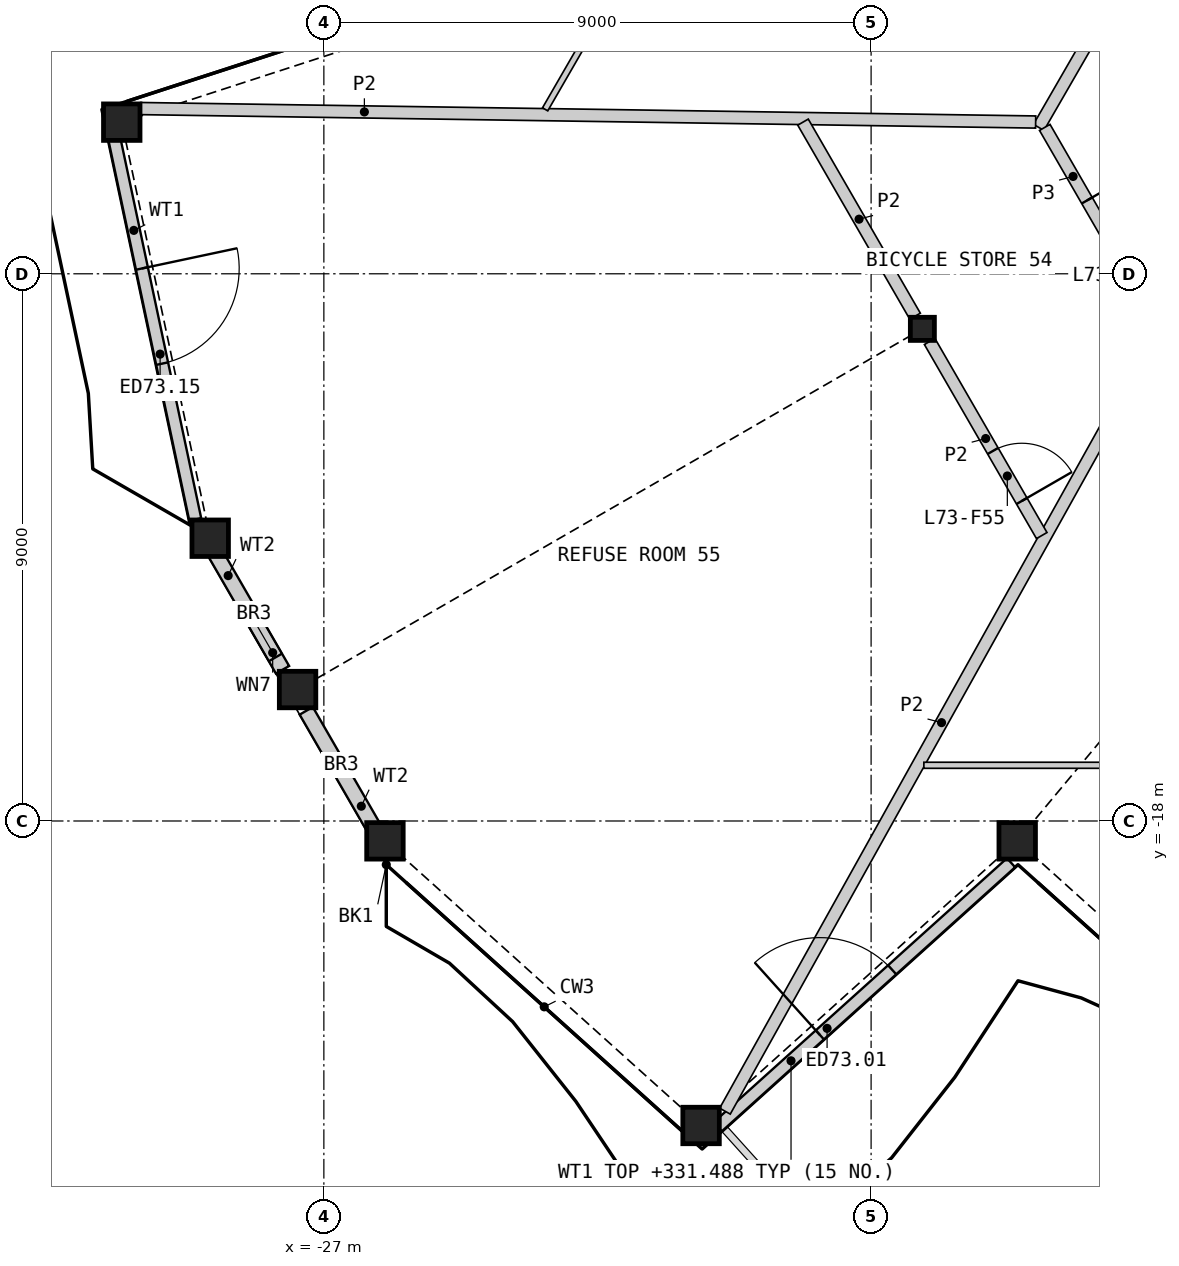
"""IFC4 building model, lengths in metres.
Left out: names, types, materials, properties, quantities, classifications, styles, units other than length and angle.
Written with IfcOpenShell. Run it as: python <this file> out.ifc"""

import sys

from ifc_helpers import new_model, si_unit, direction, frame, frame_2d, origin, origin_2d, place, context, subcontext, project, spatial, rectangle, hollow_rectangle, i_section, extrude, element, fill, save


model = new_model("IFC4")
c1 = context("Model", 3, precision=1e-05, world=origin(), true_north=direction((0.0, 1.0)))
c2 = subcontext(c1, "Body", "Model", "MODEL_VIEW")
j1 = project(units=[si_unit("LENGTHUNIT", "METRE"), si_unit("PLANEANGLEUNIT", "RADIAN")], contexts=[c1])
p1 = place(None, origin())
s1 = spatial("IfcSite", under=j1, at=p1, CompositionType="ELEMENT")
p2 = place(p1, origin())
s2 = spatial("IfcBuilding", under=s1, at=p2, CompositionType="ELEMENT")
p3 = place(p2, frame((0.0, 0.0, 329.0)))
s3 = spatial("IfcBuildingStorey", under=s2, at=p3, CompositionType="ELEMENT", Elevation=329.0)
for number, where, z_axis, x_axis in (
    (1, (-25.995, -18.327, 0.0), (0.0, 0.0, 1.0), (1.0, 0.0, 0.0)),
    (2, (-20.796, -23.008, 0.0), (0.0, 0.0, 1.0), (1.0, 0.0, 0.0)),
    (3, (-15.597, -18.327, 0.0), (0.0, 0.0, 1.0), (1.0, 0.0, 0.0)),
    (4, (-30.324, -6.506, 0.0), (0.0, 0.0, 1.0), (1.0, 0.0, 0.0)),
    (5, (-28.869, -13.349, 0.0), (0.0, 0.0, 1.0), (1.0, 0.0, 0.0)),
    (6, (-27.432, -15.838, 0.0), (0.0, 0.0, 1.0), (1.0, 0.0, 0.0)),
):
    element("IfcColumn", number, at=place(p3, frame(where, z_axis=z_axis, x_axis=x_axis)), inside=s3, PredefinedType="COLUMN", context=c2, shape_type="SweptSolid", body=[
        extrude(hollow_rectangle(XDim=0.6, YDim=0.6, WallThickness=0.04, at=origin_2d()), origin(), (0.0, 0.0, 1.0), 3.4),
    ])
p4 = place(p3, frame((-17.157, -9.906, 0.0), z_axis=(0.0, 0.0, 1.0), x_axis=(1.0, 0.0, 0.0)))
e7 = element("IfcColumn", 7, at=p4, inside=s3, PredefinedType="COLUMN", context=c2, shape_type="SweptSolid", body=[
    extrude(i_section(OverallWidth=0.396, OverallDepth=0.381, WebThickness=0.019, FlangeThickness=0.03, at=origin_2d()), origin(), (0.0, 0.0, 1.0), 3.4),
])
p5 = place(p3, frame((-20.523, -23.031, 0.0), z_axis=(0.0, 0.0, 1.0), x_axis=(0.743138937876, 0.669137145145, 0.0)))
e8 = element("IfcWall", 8, at=p5, inside=s3, PredefinedType="SOLIDWALL", context=c2, shape_type="SweptSolid", body=[
    extrude(rectangle(XDim=6.493, YDim=0.2, at=frame_2d((3.246, 0.0))), origin(), (0.0, 0.0, 1.0), 2.488),
])
p6 = place(p5, frame((2.261, 0.0, 0.0)))
e9 = element("IfcOpeningElement", 9, at=p6, cuts=e8, PredefinedType="OPENING", context=c2, shape_type="SweptSolid", body=[
    extrude(rectangle(XDim=1.6, YDim=2.25, at=frame_2d((0.8, 1.125))), frame((0.0, 0.11, 0.0), z_axis=(0.0, -1.0, 0.0), x_axis=(1.0, 0.0, 0.0)), (0.0, 0.0, 1.0), 0.22),
])
p7 = place(p3, frame((-30.462, -6.701, 0.0), z_axis=(0.0, 0.0, 1.0), x_axis=(0.207915966693, -0.978146691859, 0.0)))
e10 = element("IfcWall", 10, at=p7, inside=s3, PredefinedType="SOLIDWALL", context=c2, shape_type="SweptSolid", body=[
    extrude(rectangle(XDim=6.482, YDim=0.2, at=frame_2d((3.241, 0.0))), origin(), (0.0, 0.0, 1.0), 2.488),
])
p8 = place(p7, frame((2.261, 0.0, 0.0)))
e11 = element("IfcOpeningElement", 11, at=p8, cuts=e10, PredefinedType="OPENING", context=c2, shape_type="SweptSolid", body=[
    extrude(rectangle(XDim=1.6, YDim=2.25, at=frame_2d((0.8, 1.125))), frame((0.0, 0.11, 0.0), z_axis=(0.0, -1.0, 0.0), x_axis=(1.0, 0.0, 0.0)), (0.0, 0.0, 1.0), 0.22),
])
p9 = place(p3, frame((-28.872, -13.448, 0.0), z_axis=(0.0, 0.0, 1.0), x_axis=(0.499982446489, -0.866035538072, 0.0)))
e12 = element("IfcWall", 12, at=p9, inside=s3, PredefinedType="SOLIDWALL", context=c2, shape_type="SweptSolid", body=[
    extrude(rectangle(XDim=2.384, YDim=0.25, at=frame_2d((1.192, 0.0))), origin(), (0.0, 0.0, 1.0), 2.488),
])
p10 = place(p9, frame((1.25, 0.0, 1.6)))
e13 = element("IfcOpeningElement", 13, at=p10, cuts=e12, PredefinedType="OPENING", context=c2, shape_type="SweptSolid", body=[
    extrude(rectangle(XDim=0.9, YDim=0.6, at=frame_2d((0.45, 0.3))), frame((0.0, 0.135, 0.0), z_axis=(0.0, -1.0, 0.0), x_axis=(1.0, 0.0, 0.0)), (0.0, 0.0, 1.0), 0.27),
])
p11 = place(p3, frame((-27.29, -16.188, 0.0), z_axis=(0.0, 0.0, 1.0), x_axis=(0.50001992892, -0.866013897511, 0.0)))
e14 = element("IfcWall", 14, at=p11, inside=s3, PredefinedType="SOLIDWALL", context=c2, shape_type="SweptSolid", body=[
    extrude(rectangle(XDim=2.416, YDim=0.25, at=frame_2d((1.208, 0.0))), origin(), (0.0, 0.0, 1.0), 2.488),
])
p12 = place(p3, frame((-15.244, -6.592, 0.0), z_axis=(0.0, 0.0, 1.0), x_axis=(0.49999094734, 0.866030630277, 0.0)))
e15 = element("IfcWall", 15, at=p12, inside=s3, PredefinedType="PARTITIONING", context=c2, shape_type="SweptSolid", body=[
    extrude(rectangle(XDim=4.513, YDim=0.2, at=frame_2d((2.256, 0.0))), origin(), (0.0, 0.0, 1.0), 3.1),
])
p13 = place(p3, frame((-15.144, -6.592, 0.0), z_axis=(0.0, 0.0, 1.0), x_axis=(0.499958791762, -0.866049194065, 0.0)))
e16 = element("IfcWall", 16, at=p13, inside=s3, PredefinedType="PARTITIONING", context=c2, shape_type="SweptSolid", body=[
    extrude(rectangle(XDim=3.726, YDim=0.2, at=frame_2d((1.863, 0.0))), origin(), (0.0, 0.0, 1.0), 3.1),
])
p14 = place(p13, frame((1.388, 0.0, 0.0)))
e17 = element("IfcOpeningElement", 17, at=p14, cuts=e16, PredefinedType="OPENING", context=c2, shape_type="SweptSolid", body=[
    extrude(rectangle(XDim=0.95, YDim=2.1, at=frame_2d((0.475, 1.05))), frame((0.0, 0.11, 0.0), z_axis=(0.0, -1.0, 0.0), x_axis=(1.0, 0.0, 0.0)), (0.0, 0.0, 1.0), 0.22),
])
p15 = place(p3, frame((-20.404, -22.772, 0.0), z_axis=(0.0, 0.0, 1.0), x_axis=(0.486917529285, 0.873447949036, 0.0)))
e18 = element("IfcWall", 18, at=p15, inside=s3, PredefinedType="PARTITIONING", context=c2, shape_type="SweptSolid", body=[
    extrude(rectangle(XDim=14.631, YDim=0.2, at=frame_2d((7.315, 0.0))), origin(), (0.0, 0.0, 1.0), 2.33),
])
p16 = place(p3, frame((-30.014, -6.282, 0.0), z_axis=(0.0, 0.0, 1.0), x_axis=(0.99988686643, -0.015041753265, 0.0)))
e19 = element("IfcWall", 19, at=p16, inside=s3, PredefinedType="PARTITIONING", context=c2, shape_type="SweptSolid", body=[
    extrude(rectangle(XDim=14.721, YDim=0.2, at=frame_2d((7.361, 0.0))), origin(), (0.0, 0.0, 1.0), 2.33),
])
p17 = place(p3, frame((-17.037, -10.113, 0.0), z_axis=(0.0, 0.0, 1.0), x_axis=(0.50002820729, -0.866009117685, 0.0)))
e20 = element("IfcWall", 20, at=p17, inside=s3, PredefinedType="PARTITIONING", context=c2, shape_type="SweptSolid", body=[
    extrude(rectangle(XDim=3.686, YDim=0.2, at=frame_2d((1.843, 0.0))), origin(), (0.0, 0.0, 1.0), 2.33),
])
p18 = place(p17, frame((2.08, 0.0, 0.0)))
e21 = element("IfcOpeningElement", 21, at=p18, cuts=e20, PredefinedType="OPENING", context=c2, shape_type="SweptSolid", body=[
    extrude(rectangle(XDim=0.95, YDim=2.1, at=frame_2d((0.475, 1.05))), frame((0.0, 0.11, 0.0), z_axis=(0.0, -1.0, 0.0), x_axis=(1.0, 0.0, 0.0)), (0.0, 0.0, 1.0), 0.22),
])
p19 = place(p3, frame((-19.12, -6.506, 0.0), z_axis=(0.0, 0.0, 1.0), x_axis=(0.499978535015, -0.866037796245, 0.0)))
e22 = element("IfcWall", 22, at=p19, inside=s3, PredefinedType="PARTITIONING", context=c2, shape_type="SweptSolid", body=[
    extrude(rectangle(XDim=3.686, YDim=0.2, at=frame_2d((1.843, 0.0))), origin(), (0.0, 0.0, 1.0), 2.33),
])
p20 = place(p3, frame((-23.361, -6.295, 0.0), z_axis=(0.0, 0.0, 1.0), x_axis=(0.499987686533, 0.866032512851, 0.0)))
e23 = element("IfcWall", 23, at=p20, inside=s3, PredefinedType="PARTITIONING", context=c2, shape_type="SweptSolid", body=[
    extrude(rectangle(XDim=6.693, YDim=0.1, at=frame_2d((3.347, 0.0))), origin(), (0.0, 0.0, 1.0), 2.33),
])
p21 = place(p20, frame((3.275, 0.0, 0.0)))
e24 = element("IfcOpeningElement", 24, at=p21, cuts=e23, PredefinedType="OPENING", context=c2, shape_type="SweptSolid", body=[
    extrude(rectangle(XDim=0.95, YDim=2.1, at=frame_2d((0.475, 1.05))), frame((0.0, 0.06, 0.0), z_axis=(0.0, -1.0, 0.0), x_axis=(1.0, 0.0, 0.0)), (0.0, 0.0, 1.0), 0.12),
])
p22 = place(p3, frame((-17.132, -17.084, 0.0), z_axis=(0.0, 0.0, 1.0), x_axis=(1.0, 0.0, 0.0)))
e25 = element("IfcWall", 25, at=p22, inside=s3, PredefinedType="PARTITIONING", context=c2, shape_type="SweptSolid", body=[
    extrude(rectangle(XDim=6.693, YDim=0.1, at=frame_2d((3.346, 0.0))), origin(), (0.0, 0.0, 1.0), 2.33),
])
p23 = place(p22, frame((4.989, 0.0, 0.0)))
e26 = element("IfcOpeningElement", 26, at=p23, cuts=e25, PredefinedType="OPENING", context=c2, shape_type="SweptSolid", body=[
    extrude(rectangle(XDim=0.95, YDim=2.1, at=frame_2d((0.475, 1.05))), frame((0.0, 0.06, 0.0), z_axis=(0.0, -1.0, 0.0), x_axis=(1.0, 0.0, 0.0)), (0.0, 0.0, 1.0), 0.12),
])
p24 = place(p6, origin())
e27 = element("IfcDoor", 27, at=p24, inside=s3, OperationType="DOUBLE_DOOR_SINGLE_SWING", PredefinedType="DOOR", context=c2, shape_type="SweptSolid", body=[
    extrude(rectangle(XDim=1.6, YDim=2.25, at=frame_2d((0.8, 1.125))), frame((0.0, 0.025, 0.0), z_axis=(0.0, -1.0, 0.0), x_axis=(1.0, 0.0, 0.0)), (0.0, 0.0, 1.0), 0.05),
])
fill(e9, e27)
p25 = place(p8, origin())
e28 = element("IfcDoor", 28, at=p25, inside=s3, OperationType="DOUBLE_DOOR_SINGLE_SWING", PredefinedType="DOOR", context=c2, shape_type="SweptSolid", body=[
    extrude(rectangle(XDim=1.6, YDim=2.25, at=frame_2d((0.8, 1.125))), frame((0.0, 0.025, 0.0), z_axis=(0.0, -1.0, 0.0), x_axis=(1.0, 0.0, 0.0)), (0.0, 0.0, 1.0), 0.05),
])
fill(e11, e28)
p26 = place(p10, origin())
e29 = element("IfcWindow", 29, at=p26, inside=s3, PartitioningType="SINGLE_PANEL", PredefinedType="WINDOW", context=c2, shape_type="SweptSolid", body=[
    extrude(rectangle(XDim=0.9, YDim=0.6, at=frame_2d((0.45, 0.3))), frame((0.0, 0.03, 0.0), z_axis=(0.0, -1.0, 0.0), x_axis=(1.0, 0.0, 0.0)), (0.0, 0.0, 1.0), 0.06),
])
fill(e13, e29)
p27 = place(p14, origin())
e30 = element("IfcDoor", 30, at=p27, inside=s3, OperationType="SINGLE_SWING_LEFT", PredefinedType="DOOR", context=c2, shape_type="SweptSolid", body=[
    extrude(rectangle(XDim=0.95, YDim=2.1, at=frame_2d((0.475, 1.05))), frame((0.0, 0.025, 0.0), z_axis=(0.0, -1.0, 0.0), x_axis=(1.0, 0.0, 0.0)), (0.0, 0.0, 1.0), 0.05),
])
fill(e17, e30)
p28 = place(p18, origin())
e31 = element("IfcDoor", 31, at=p28, inside=s3, OperationType="SINGLE_SWING_RIGHT", PredefinedType="DOOR", context=c2, shape_type="SweptSolid", body=[
    extrude(rectangle(XDim=0.95, YDim=2.1, at=frame_2d((0.475, 1.05))), frame((0.0, 0.025, 0.0), z_axis=(0.0, -1.0, 0.0), x_axis=(1.0, 0.0, 0.0)), (0.0, 0.0, 1.0), 0.05),
])
fill(e21, e31)
save(model, sys.argv[1])
